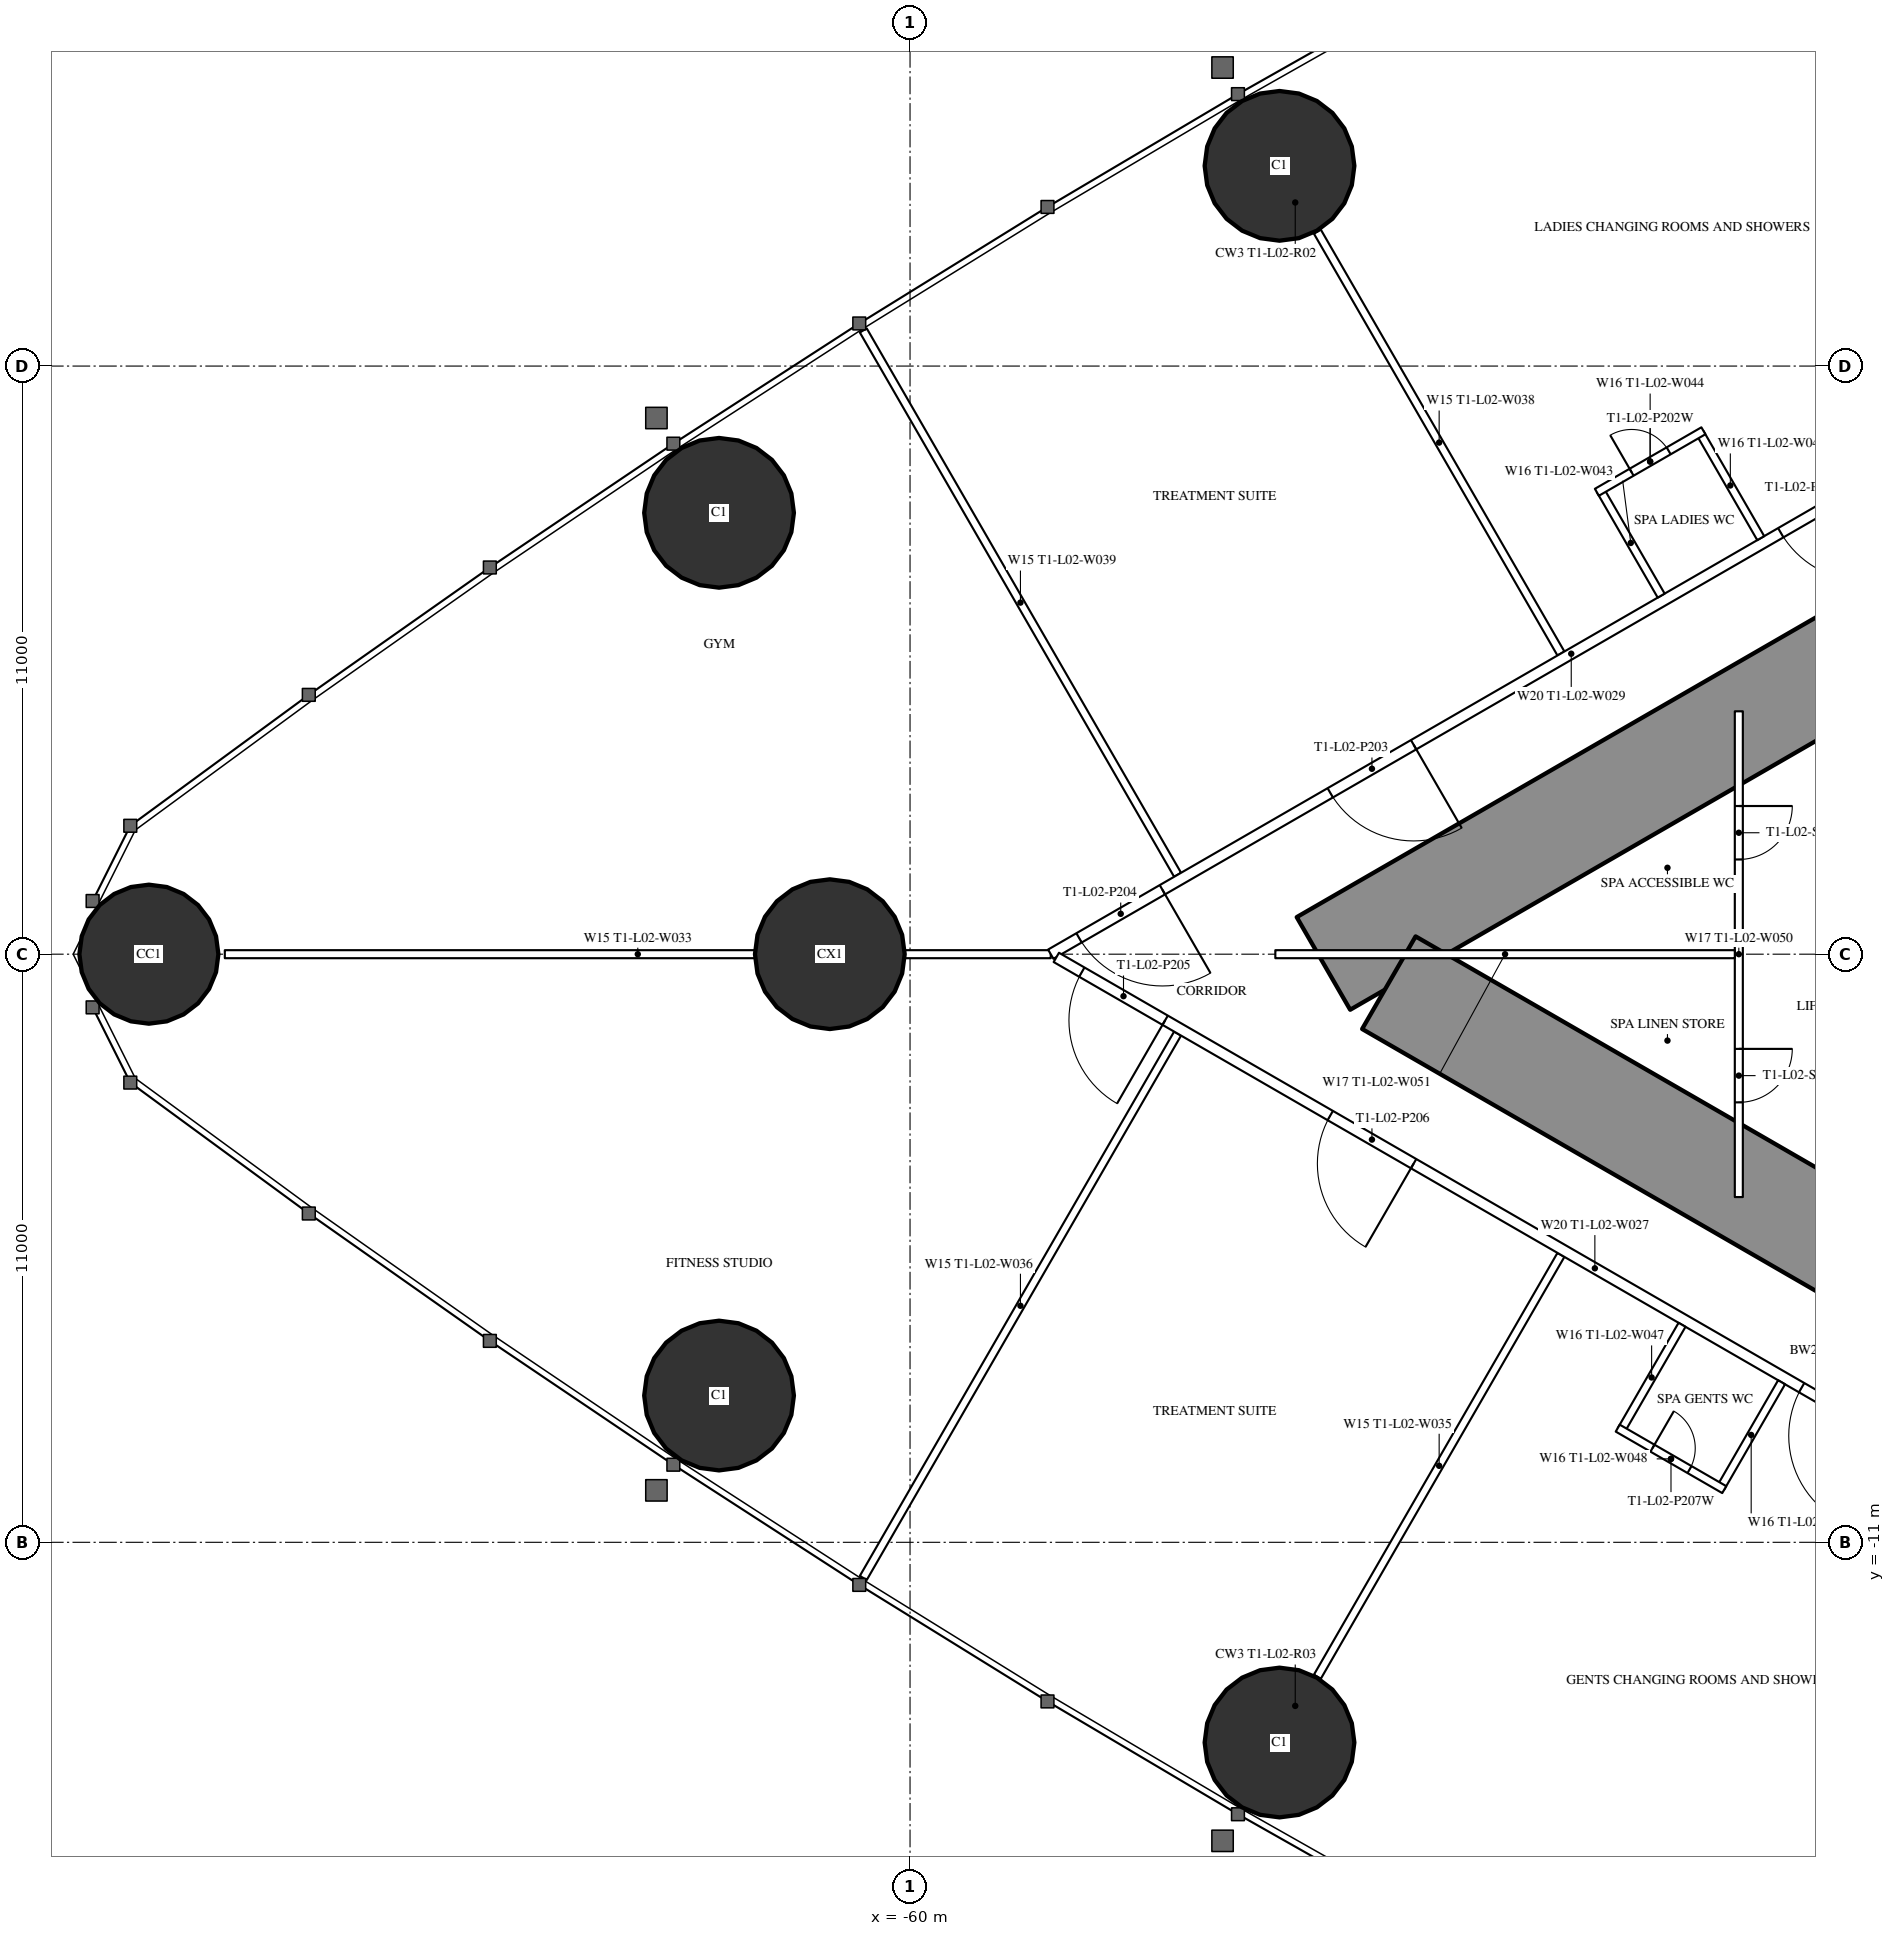
"""IFC4 building model, lengths in metres.
Left out: names, types, materials, properties, quantities, classifications, styles, units other than length and angle.
Written with IfcOpenShell. Run it as: python <this file> out.ifc"""

import sys

from ifc_helpers import new_model, si_unit, direction, frame, frame_2d, origin, origin_2d, place, context, subcontext, project, spatial, rectangle, hollow_circle, extrude, element, fill, save


model = new_model("IFC4")
c1 = context("Model", 3, precision=1e-05, world=origin(), true_north=direction((0.0, 1.0)))
c2 = subcontext(c1, "Body", "Model", "MODEL_VIEW")
j1 = project(units=[si_unit("LENGTHUNIT", "METRE"), si_unit("PLANEANGLEUNIT", "RADIAN")], contexts=[c1])
p1 = place(None, origin())
s1 = spatial("IfcSite", under=j1, at=p1, CompositionType="ELEMENT")
p2 = place(p1, origin())
s2 = spatial("IfcBuilding", under=s1, at=p2, CompositionType="ELEMENT")
p3 = place(p2, frame((0.0, 0.0, 12.6)))
s3 = spatial("IfcBuildingStorey", under=s2, at=p3, CompositionType="ELEMENT", Elevation=12.6)
p4 = place(p3, frame((-74.235, 0.0, 0.0), z_axis=(0.0, 0.0, 1.0), x_axis=(1.0, 0.0, 0.0)))
e1 = element("IfcColumn", 1, at=p4, inside=s3, PredefinedType="COLUMN", context=c2, shape_type="SweptSolid", body=[
    extrude(hollow_circle(Radius=1.3, WallThickness=0.1, at=origin_2d()), origin(), (0.0, 0.0, 1.0), 5.4),
])
for number, where, z_axis, x_axis in (
    (2, (-63.572, -8.255, 0.0), (0.0, 0.0, 1.0), (1.0, 0.0, 0.0)),
    (3, (-53.09, -14.745, 0.0), (0.0, 0.0, 1.0), (1.0, 0.0, 0.0)),
    (4, (-53.09, 14.745, 0.0), (0.0, 0.0, 1.0), (1.0, 0.0, 0.0)),
    (5, (-63.572, 8.255, 0.0), (0.0, 0.0, 1.0), (1.0, 0.0, 0.0)),
):
    element("IfcColumn", number, at=place(p3, frame(where, z_axis=z_axis, x_axis=x_axis)), inside=s3, PredefinedType="COLUMN", context=c2, shape_type="SweptSolid", body=[
        extrude(hollow_circle(Radius=1.4, WallThickness=0.12, at=origin_2d()), origin(), (0.0, 0.0, 1.0), 5.4),
    ])
p5 = place(p3, frame((-61.5, 0.0, 0.0), z_axis=(0.0, 0.0, 1.0), x_axis=(1.0, 0.0, 0.0)))
e6 = element("IfcColumn", 6, at=p5, inside=s3, PredefinedType="COLUMN", context=c2, shape_type="SweptSolid", body=[
    extrude(hollow_circle(Radius=1.4, WallThickness=0.1, at=origin_2d()), origin(), (0.0, 0.0, 1.0), 5.4),
])
p6 = place(p3, frame((-27.2, 14.3, 0.0), z_axis=(0.0, 0.0, 1.0), x_axis=(-0.866026593062, -0.499997940104, 0.0)))
e7 = element("IfcWall", 7, at=p6, inside=s3, PredefinedType="SHEAR", context=c2, shape_type="SweptSolid", body=[
    extrude(rectangle(XDim=28.946, YDim=2.0, at=frame_2d((14.473, 0.0))), origin(), (0.0, 0.0, 1.0), 5.4),
])
p7 = place(p6, frame((4.6, 0.0, 0.0)))
e8 = element("IfcOpeningElement", 8, at=p7, cuts=e7, PredefinedType="OPENING", context=c2, shape_type="SweptSolid", body=[
    extrude(rectangle(XDim=1.0, YDim=2.2, at=frame_2d((0.5, 1.1))), frame((0.0, 1.01, 0.0), z_axis=(0.0, -1.0, 0.0), x_axis=(1.0, 0.0, 0.0)), (0.0, 0.0, 1.0), 2.02),
])
p8 = place(p6, frame((13.395, 0.0, 0.0)))
e9 = element("IfcOpeningElement", 9, at=p8, cuts=e7, PredefinedType="OPENING", context=c2, shape_type="SweptSolid", body=[
    extrude(rectangle(XDim=1.8, YDim=2.2, at=frame_2d((0.9, 1.1))), frame((0.0, 1.01, 0.0), z_axis=(0.0, -1.0, 0.0), x_axis=(1.0, 0.0, 0.0)), (0.0, 0.0, 1.0), 2.02),
])
p9 = place(p3, frame((-27.2, -14.3, 0.0), z_axis=(0.0, 0.0, 1.0), x_axis=(-0.866024044937, 0.500002353585, 0.0)))
e10 = element("IfcWall", 10, at=p9, inside=s3, PredefinedType="SHEAR", context=c2, shape_type="SweptSolid", body=[
    extrude(rectangle(XDim=27.533, YDim=2.0, at=frame_2d((13.767, 0.0))), origin(), (0.0, 0.0, 1.0), 5.4),
])
p10 = place(p9, frame((4.6, 0.0, 0.0)))
e11 = element("IfcOpeningElement", 11, at=p10, cuts=e10, PredefinedType="OPENING", context=c2, shape_type="SweptSolid", body=[
    extrude(rectangle(XDim=1.0, YDim=2.2, at=frame_2d((0.5, 1.1))), frame((0.0, 1.01, 0.0), z_axis=(0.0, -1.0, 0.0), x_axis=(1.0, 0.0, 0.0)), (0.0, 0.0, 1.0), 2.02),
])
p11 = place(p9, frame((13.395, 0.0, 0.0)))
e12 = element("IfcOpeningElement", 12, at=p11, cuts=e10, PredefinedType="OPENING", context=c2, shape_type="SweptSolid", body=[
    extrude(rectangle(XDim=1.8, YDim=2.2, at=frame_2d((0.9, 1.1))), frame((0.0, 1.01, 0.0), z_axis=(0.0, -1.0, 0.0), x_axis=(1.0, 0.0, 0.0)), (0.0, 0.0, 1.0), 2.02),
])
p12 = place(p3, frame((-47.827, 5.624, 0.0), z_axis=(0.0, 0.0, 1.0), x_axis=(-0.499995404498, 0.866028056982, 0.0)))
e13 = element("IfcWall", 13, at=p12, inside=s3, PredefinedType="PARTITIONING", context=c2, shape_type="SweptSolid", body=[
    extrude(rectangle(XDim=9.11, YDim=0.15, at=frame_2d((4.555, 0.0))), origin(), (0.0, 0.0, 1.0), 4.15),
])
p13 = place(p3, frame((-54.996, 1.485, 0.0), z_axis=(0.0, 0.0, 1.0), x_axis=(-0.500002871521, 0.866023745905, 0.0)))
e14 = element("IfcWall", 14, at=p13, inside=s3, PredefinedType="PARTITIONING", context=c2, shape_type="SweptSolid", body=[
    extrude(rectangle(XDim=11.757, YDim=0.15, at=frame_2d((5.878, 0.0))), origin(), (0.0, 0.0, 1.0), 5.15),
])
p14 = place(p3, frame((-47.827, -5.624, 0.0), z_axis=(0.0, 0.0, 1.0), x_axis=(-0.499995404498, -0.866028056982, 0.0)))
e15 = element("IfcWall", 15, at=p14, inside=s3, PredefinedType="PARTITIONING", context=c2, shape_type="SweptSolid", body=[
    extrude(rectangle(XDim=9.11, YDim=0.15, at=frame_2d((4.555, 0.0))), origin(), (0.0, 0.0, 1.0), 4.15),
])
p15 = place(p3, frame((-54.996, -1.485, 0.0), z_axis=(0.0, 0.0, 1.0), x_axis=(-0.500002871521, -0.866023745905, 0.0)))
e16 = element("IfcWall", 16, at=p15, inside=s3, PredefinedType="PARTITIONING", context=c2, shape_type="SweptSolid", body=[
    extrude(rectangle(XDim=11.757, YDim=0.15, at=frame_2d((5.878, 0.0))), origin(), (0.0, 0.0, 1.0), 5.15),
])
p16 = place(p3, frame((-57.368, 0.0, 0.0), z_axis=(0.0, 0.0, 1.0), x_axis=(-1.0, 0.0, 0.0)))
e17 = element("IfcWall", 17, at=p16, inside=s3, PredefinedType="PARTITIONING", context=c2, shape_type="SweptSolid", body=[
    extrude(rectangle(XDim=15.447, YDim=0.15, at=frame_2d((7.724, 0.0))), origin(), (0.0, 0.0, 1.0), 4.15),
])
p17 = place(p3, frame((-37.9, 11.24, 0.0), z_axis=(0.0, 0.0, 1.0), x_axis=(-0.866022995118, -0.50000417191, 0.0)))
e18 = element("IfcWall", 18, at=p17, inside=s3, PredefinedType="PARTITIONING", context=c2, shape_type="SweptSolid", body=[
    extrude(rectangle(XDim=22.48, YDim=0.2, at=frame_2d((11.24, 0.0))), origin(), (0.0, 0.0, 1.0), 4.25),
])
p18 = place(p17, frame((14.644, 0.0, 0.0)))
e19 = element("IfcOpeningElement", 19, at=p18, cuts=e18, PredefinedType="OPENING", context=c2, shape_type="SweptSolid", body=[
    extrude(rectangle(XDim=1.8, YDim=2.2, at=frame_2d((0.9, 1.1))), frame((0.0, 0.11, 0.0), z_axis=(0.0, -1.0, 0.0), x_axis=(1.0, 0.0, 0.0)), (0.0, 0.0, 1.0), 0.22),
])
p19 = place(p17, frame((20.069, 0.0, 0.0)))
e20 = element("IfcOpeningElement", 20, at=p19, cuts=e18, PredefinedType="OPENING", context=c2, shape_type="SweptSolid", body=[
    extrude(rectangle(XDim=1.8, YDim=2.2, at=frame_2d((0.9, 1.1))), frame((0.0, 0.11, 0.0), z_axis=(0.0, -1.0, 0.0), x_axis=(1.0, 0.0, 0.0)), (0.0, 0.0, 1.0), 0.22),
])
p20 = place(p17, frame((4.915, 0.0, 0.0)))
e21 = element("IfcOpeningElement", 21, at=p20, cuts=e18, PredefinedType="OPENING", context=c2, shape_type="SweptSolid", body=[
    extrude(rectangle(XDim=1.8, YDim=2.2, at=frame_2d((0.9, 1.1))), frame((0.0, 0.11, 0.0), z_axis=(0.0, -1.0, 0.0), x_axis=(1.0, 0.0, 0.0)), (0.0, 0.0, 1.0), 0.22),
])
p21 = place(p3, frame((-37.12, -11.69, 0.0), z_axis=(0.0, 0.0, 1.0), x_axis=(-0.866028803602, 0.499994111297, 0.0)))
e22 = element("IfcWall", 22, at=p21, inside=s3, PredefinedType="PARTITIONING", context=c2, shape_type="SweptSolid", body=[
    extrude(rectangle(XDim=23.26, YDim=0.2, at=frame_2d((11.63, 0.0))), origin(), (0.0, 0.0, 1.0), 4.25),
])
p22 = place(p21, frame((20.909, 0.0, 0.0)))
e23 = element("IfcOpeningElement", 23, at=p22, cuts=e22, PredefinedType="OPENING", context=c2, shape_type="SweptSolid", body=[
    extrude(rectangle(XDim=1.8, YDim=2.2, at=frame_2d((0.9, 1.1))), frame((0.0, 0.11, 0.0), z_axis=(0.0, -1.0, 0.0), x_axis=(1.0, 0.0, 0.0)), (0.0, 0.0, 1.0), 0.22),
])
p23 = place(p21, frame((15.544, 0.0, 0.0)))
e24 = element("IfcOpeningElement", 24, at=p23, cuts=e22, PredefinedType="OPENING", context=c2, shape_type="SweptSolid", body=[
    extrude(rectangle(XDim=1.8, YDim=2.2, at=frame_2d((0.9, 1.1))), frame((0.0, 0.11, 0.0), z_axis=(0.0, -1.0, 0.0), x_axis=(1.0, 0.0, 0.0)), (0.0, 0.0, 1.0), 0.22),
])
p24 = place(p21, frame((5.365, 0.0, 0.0)))
e25 = element("IfcOpeningElement", 25, at=p24, cuts=e22, PredefinedType="OPENING", context=c2, shape_type="SweptSolid", body=[
    extrude(rectangle(XDim=1.8, YDim=2.2, at=frame_2d((0.9, 1.1))), frame((0.0, 0.11, 0.0), z_axis=(0.0, -1.0, 0.0), x_axis=(1.0, 0.0, 0.0)), (0.0, 0.0, 1.0), 0.22),
])
p25 = place(p3, frame((-44.5, 4.543, 0.0), z_axis=(0.0, 0.0, 1.0), x_axis=(0.0, -1.0, 0.0)))
e26 = element("IfcWall", 26, at=p25, inside=s3, PredefinedType="PARTITIONING", context=c2, shape_type="SweptSolid", body=[
    extrude(rectangle(XDim=9.085, YDim=0.15, at=frame_2d((4.543, 0.0))), origin(), (0.0, 0.0, 1.0), 5.15),
])
p26 = place(p25, frame((1.771, 0.0, 0.0)))
e27 = element("IfcOpeningElement", 27, at=p26, cuts=e26, PredefinedType="OPENING", context=c2, shape_type="SweptSolid", body=[
    extrude(rectangle(XDim=1.0, YDim=2.2, at=frame_2d((0.5, 1.1))), frame((0.0, 0.085, 0.0), z_axis=(0.0, -1.0, 0.0), x_axis=(1.0, 0.0, 0.0)), (0.0, 0.0, 1.0), 0.17),
])
p27 = place(p25, frame((6.314, 0.0, 0.0)))
e28 = element("IfcOpeningElement", 28, at=p27, cuts=e26, PredefinedType="OPENING", context=c2, shape_type="SweptSolid", body=[
    extrude(rectangle(XDim=1.0, YDim=2.2, at=frame_2d((0.5, 1.1))), frame((0.0, 0.085, 0.0), z_axis=(0.0, -1.0, 0.0), x_axis=(1.0, 0.0, 0.0)), (0.0, 0.0, 1.0), 0.17),
])
p28 = place(p3, frame((-44.575, 0.0, 0.0), z_axis=(0.0, 0.0, 1.0), x_axis=(-1.0, 0.0, 0.0)))
e29 = element("IfcWall", 29, at=p28, inside=s3, PredefinedType="PARTITIONING", context=c2, shape_type="SweptSolid", body=[
    extrude(rectangle(XDim=8.593, YDim=0.15, at=frame_2d((4.297, 0.0))), origin(), (0.0, 0.0, 1.0), 4.15),
])
for number, where, z_axis, x_axis in (
    (30, (-43.7, -8.007, 0.0), (0.0, 0.0, 1.0), (-0.5, -0.866, 0.0)),
    (31, (-45.562, -6.932, 0.0), (0.0, 0.0, 1.0), (-0.5, -0.866, 0.0)),
):
    element("IfcWall", number, at=place(p3, frame(where, z_axis=z_axis, x_axis=x_axis)), inside=s3, PredefinedType="PARTITIONING", context=c2, shape_type="SweptSolid", body=[
        extrude(rectangle(XDim=2.275, YDim=0.15, at=frame_2d((1.137, 0.0))), origin(), (0.0, 0.0, 1.0), 5.15),
    ])
p29 = place(p3, frame((-44.773, -10.014, 0.0), z_axis=(0.0, 0.0, 1.0), x_axis=(-0.86602648383, 0.499998129301, 0.0)))
e32 = element("IfcWall", 32, at=p29, inside=s3, PredefinedType="PARTITIONING", context=c2, shape_type="SweptSolid", body=[
    extrude(rectangle(XDim=2.3, YDim=0.15, at=frame_2d((1.15, 0.0))), origin(), (0.0, 0.0, 1.0), 5.15),
])
p30 = place(p29, frame((0.75, 0.0, 0.0)))
e33 = element("IfcOpeningElement", 33, at=p30, cuts=e32, PredefinedType="OPENING", context=c2, shape_type="SweptSolid", body=[
    extrude(rectangle(XDim=0.8, YDim=2.2, at=frame_2d((0.4, 1.1))), frame((0.0, 0.085, 0.0), z_axis=(0.0, -1.0, 0.0), x_axis=(1.0, 0.0, 0.0)), (0.0, 0.0, 1.0), 0.17),
])
p31 = place(p3, frame((-44.09, 7.782, 0.0), z_axis=(0.0, 0.0, 1.0), x_axis=(-0.499982560684, 0.866035472144, 0.0)))
e34 = element("IfcWall", 34, at=p31, inside=s3, PredefinedType="PARTITIONING", context=c2, shape_type="SweptSolid", body=[
    extrude(rectangle(XDim=2.275, YDim=0.15, at=frame_2d((1.137, 0.0))), origin(), (0.0, 0.0, 1.0), 5.15),
])
p32 = place(p3, frame((-45.952, 6.707, 0.0), z_axis=(0.0, 0.0, 1.0), x_axis=(-0.500063042646, 0.865989003036, 0.0)))
e35 = element("IfcWall", 35, at=p32, inside=s3, PredefinedType="PARTITIONING", context=c2, shape_type="SweptSolid", body=[
    extrude(rectangle(XDim=2.275, YDim=0.15, at=frame_2d((1.138, 0.0))), origin(), (0.0, 0.0, 1.0), 5.15),
])
p33 = place(p3, frame((-45.163, 9.789, 0.0), z_axis=(0.0, 0.0, 1.0), x_axis=(-0.866053019151, -0.499952165731, 0.0)))
e36 = element("IfcWall", 36, at=p33, inside=s3, PredefinedType="PARTITIONING", context=c2, shape_type="SweptSolid", body=[
    extrude(rectangle(XDim=2.3, YDim=0.15, at=frame_2d((1.15, 0.0))), origin(), (0.0, 0.0, 1.0), 5.15),
])
p34 = place(p33, frame((0.75, 0.0, 0.0)))
e37 = element("IfcOpeningElement", 37, at=p34, cuts=e36, PredefinedType="OPENING", context=c2, shape_type="SweptSolid", body=[
    extrude(rectangle(XDim=0.8, YDim=2.2, at=frame_2d((0.4, 1.1))), frame((0.0, 0.085, 0.0), z_axis=(0.0, -1.0, 0.0), x_axis=(1.0, 0.0, 0.0)), (0.0, 0.0, 1.0), 0.17),
])
p35 = place(p18, origin())
e38 = element("IfcDoor", 38, at=p35, inside=s3, OperationType="DOUBLE_DOOR_SINGLE_SWING", PredefinedType="DOOR", context=c2, shape_type="SweptSolid", body=[
    extrude(rectangle(XDim=1.8, YDim=2.2, at=frame_2d((0.9, 1.1))), frame((0.0, 0.025, 0.0), z_axis=(0.0, -1.0, 0.0), x_axis=(1.0, 0.0, 0.0)), (0.0, 0.0, 1.0), 0.05),
])
fill(e19, e38)
p36 = place(p19, origin())
e39 = element("IfcDoor", 39, at=p36, inside=s3, OperationType="DOUBLE_DOOR_SINGLE_SWING", PredefinedType="DOOR", context=c2, shape_type="SweptSolid", body=[
    extrude(rectangle(XDim=1.8, YDim=2.2, at=frame_2d((0.9, 1.1))), frame((0.0, 0.025, 0.0), z_axis=(0.0, -1.0, 0.0), x_axis=(1.0, 0.0, 0.0)), (0.0, 0.0, 1.0), 0.05),
])
fill(e20, e39)
p37 = place(p22, origin())
e40 = element("IfcDoor", 40, at=p37, inside=s3, OperationType="DOUBLE_DOOR_SINGLE_SWING", PredefinedType="DOOR", context=c2, shape_type="SweptSolid", body=[
    extrude(rectangle(XDim=1.8, YDim=2.2, at=frame_2d((0.9, 1.1))), frame((0.0, 0.025, 0.0), z_axis=(0.0, -1.0, 0.0), x_axis=(1.0, 0.0, 0.0)), (0.0, 0.0, 1.0), 0.05),
])
fill(e23, e40)
p38 = place(p23, origin())
e41 = element("IfcDoor", 41, at=p38, inside=s3, OperationType="DOUBLE_DOOR_SINGLE_SWING", PredefinedType="DOOR", context=c2, shape_type="SweptSolid", body=[
    extrude(rectangle(XDim=1.8, YDim=2.2, at=frame_2d((0.9, 1.1))), frame((0.0, 0.025, 0.0), z_axis=(0.0, -1.0, 0.0), x_axis=(1.0, 0.0, 0.0)), (0.0, 0.0, 1.0), 0.05),
])
fill(e24, e41)
p39 = place(p24, origin())
e42 = element("IfcDoor", 42, at=p39, inside=s3, OperationType="DOUBLE_DOOR_SINGLE_SWING", PredefinedType="DOOR", context=c2, shape_type="SweptSolid", body=[
    extrude(rectangle(XDim=1.8, YDim=2.2, at=frame_2d((0.9, 1.1))), frame((0.0, 0.025, 0.0), z_axis=(0.0, -1.0, 0.0), x_axis=(1.0, 0.0, 0.0)), (0.0, 0.0, 1.0), 0.05),
])
fill(e25, e42)
p40 = place(p20, origin())
e43 = element("IfcDoor", 43, at=p40, inside=s3, OperationType="DOUBLE_DOOR_SINGLE_SWING", PredefinedType="DOOR", context=c2, shape_type="SweptSolid", body=[
    extrude(rectangle(XDim=1.8, YDim=2.2, at=frame_2d((0.9, 1.1))), frame((0.0, 0.025, 0.0), z_axis=(0.0, -1.0, 0.0), x_axis=(1.0, 0.0, 0.0)), (0.0, 0.0, 1.0), 0.05),
])
fill(e21, e43)
p41 = place(p26, origin())
e44 = element("IfcDoor", 44, at=p41, inside=s3, OperationType="SINGLE_SWING_LEFT", PredefinedType="DOOR", context=c2, shape_type="SweptSolid", body=[
    extrude(rectangle(XDim=1.0, YDim=2.2, at=frame_2d((0.5, 1.1))), frame((0.0, 0.025, 0.0), z_axis=(0.0, -1.0, 0.0), x_axis=(1.0, 0.0, 0.0)), (0.0, 0.0, 1.0), 0.05),
])
fill(e27, e44)
p42 = place(p27, origin())
e45 = element("IfcDoor", 45, at=p42, inside=s3, OperationType="SINGLE_SWING_LEFT", PredefinedType="DOOR", context=c2, shape_type="SweptSolid", body=[
    extrude(rectangle(XDim=1.0, YDim=2.2, at=frame_2d((0.5, 1.1))), frame((0.0, 0.025, 0.0), z_axis=(0.0, -1.0, 0.0), x_axis=(1.0, 0.0, 0.0)), (0.0, 0.0, 1.0), 0.05),
])
fill(e28, e45)
p43 = place(p30, origin())
e46 = element("IfcDoor", 46, at=p43, inside=s3, OperationType="SINGLE_SWING_RIGHT", PredefinedType="DOOR", context=c2, shape_type="SweptSolid", body=[
    extrude(rectangle(XDim=0.8, YDim=2.2, at=frame_2d((0.4, 1.1))), frame((0.0, 0.025, 0.0), z_axis=(0.0, -1.0, 0.0), x_axis=(1.0, 0.0, 0.0)), (0.0, 0.0, 1.0), 0.05),
])
fill(e33, e46)
p44 = place(p34, origin())
e47 = element("IfcDoor", 47, at=p44, inside=s3, OperationType="SINGLE_SWING_RIGHT", PredefinedType="DOOR", context=c2, shape_type="SweptSolid", body=[
    extrude(rectangle(XDim=0.8, YDim=2.2, at=frame_2d((0.4, 1.1))), frame((0.0, 0.025, 0.0), z_axis=(0.0, -1.0, 0.0), x_axis=(1.0, 0.0, 0.0)), (0.0, 0.0, 1.0), 0.05),
])
fill(e37, e47)
save(model, sys.argv[1])
